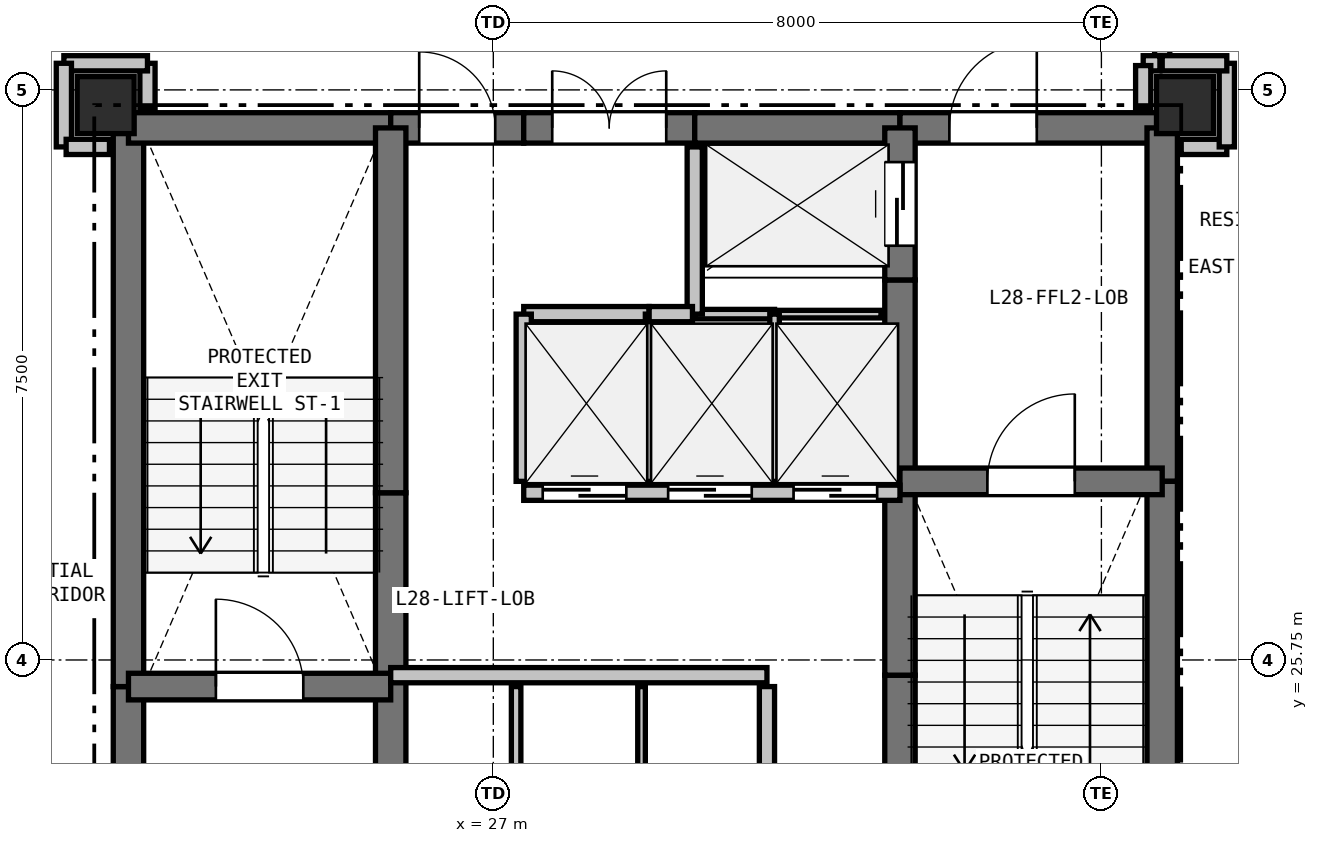
"""IFC4 building model, lengths in metres.
Left out: names, types, materials, properties, quantities, classifications, styles, units other than length and angle.
Written with IfcOpenShell. Run it as: python <this file> out.ifc"""

import sys

from ifc_helpers import new_model, si_unit, direction, frame, frame_2d, origin, origin_2d, place, context, subcontext, project, spatial, rectangle, extrude, element, fill, save


model = new_model("IFC4")
c1 = context("Model", 3, precision=1e-05, world=origin(), true_north=direction((0.0, 1.0)))
c2 = subcontext(c1, "Body", "Model", "MODEL_VIEW")
j1 = project(units=[si_unit("LENGTHUNIT", "METRE"), si_unit("PLANEANGLEUNIT", "RADIAN")], contexts=[c1])
p1 = place(None, origin())
s1 = spatial("IfcSite", under=j1, at=p1, CompositionType="ELEMENT")
p2 = place(p1, origin())
s2 = spatial("IfcBuilding", under=s1, at=p2, CompositionType="ELEMENT")
p3 = place(p2, frame((0.0, 0.0, 103.2)))
s3 = spatial("IfcBuildingStorey", under=s2, at=p3, CompositionType="ELEMENT", Elevation=103.2)
for number, where, z_axis, x_axis in (
    (1, (21.9, 33.05, 0.0), (0.0, 0.0, 1.0), (1.0, 0.0, 0.0)),
    (2, (36.1, 33.05, 0.0), (0.0, 0.0, 1.0), (1.0, 0.0, 0.0)),
):
    element("IfcColumn", number, at=place(p3, frame(where, z_axis=z_axis, x_axis=x_axis)), inside=s3, PredefinedType="COLUMN", context=c2, shape_type="SweptSolid", body=[
        extrude(rectangle(XDim=0.75, YDim=0.75, at=origin_2d()), origin(), (0.0, 0.0, 1.0), 3.3),
    ])
p4 = place(p3, frame((22.2, 20.75, 0.0), z_axis=(0.0, 0.0, 1.0), x_axis=(0.0, 1.0, 0.0)))
e3 = element("IfcWall", 3, at=p4, inside=s3, PredefinedType="SHEAR", context=c2, shape_type="SweptSolid", body=[
    extrude(rectangle(XDim=4.65, YDim=0.4, at=frame_2d((2.325, 0.0))), origin(), (0.0, 0.0, 1.0), 3.05),
])
p5 = place(p3, frame((22.2, 25.4, 0.0), z_axis=(0.0, 0.0, 1.0), x_axis=(0.0, 1.0, 0.0)))
e4 = element("IfcWall", 4, at=p5, inside=s3, PredefinedType="SHEAR", context=c2, shape_type="SweptSolid", body=[
    extrude(rectangle(XDim=7.35, YDim=0.4, at=frame_2d((3.675, 0.0))), origin(), (0.0, 0.0, 1.0), 3.05),
])
p6 = place(p3, frame((22.2, 32.75, 0.0), z_axis=(0.0, 0.0, 1.0), x_axis=(1.0, 0.0, 0.0)))
e5 = element("IfcWall", 5, at=p6, inside=s3, PredefinedType="SHEAR", context=c2, shape_type="SweptSolid", body=[
    extrude(rectangle(XDim=3.45, YDim=0.4, at=frame_2d((1.725, 0.0))), origin(), (0.0, 0.0, 1.0), 3.05),
])
p7 = place(p3, frame((25.65, 32.75, 0.0), z_axis=(0.0, 0.0, 1.0), x_axis=(1.0, 0.0, 0.0)))
e6 = element("IfcWall", 6, at=p7, inside=s3, PredefinedType="SHEAR", context=c2, shape_type="SweptSolid", body=[
    extrude(rectangle(XDim=1.75, YDim=0.4, at=frame_2d((0.875, 0.0))), origin(), (0.0, 0.0, 1.0), 3.05),
])
p8 = place(p7, frame((0.375, 0.0, 0.0)))
e7 = element("IfcOpeningElement", 7, at=p8, cuts=e6, PredefinedType="OPENING", context=c2, shape_type="SweptSolid", body=[
    extrude(rectangle(XDim=1.0, YDim=2.15, at=frame_2d((0.5, 1.075))), frame((0.0, 0.21, 0.0), z_axis=(0.0, -1.0, 0.0), x_axis=(1.0, 0.0, 0.0)), (0.0, 0.0, 1.0), 0.42),
])
p9 = place(p3, frame((27.4, 32.75, 0.0), z_axis=(0.0, 0.0, 1.0), x_axis=(1.0, 0.0, 0.0)))
e8 = element("IfcWall", 8, at=p9, inside=s3, PredefinedType="SHEAR", context=c2, shape_type="SweptSolid", body=[
    extrude(rectangle(XDim=2.25, YDim=0.4, at=frame_2d((1.125, 0.0))), origin(), (0.0, 0.0, 1.0), 3.05),
])
p10 = place(p9, frame((0.375, 0.0, 0.0)))
e9 = element("IfcOpeningElement", 9, at=p10, cuts=e8, PredefinedType="OPENING", context=c2, shape_type="SweptSolid", body=[
    extrude(rectangle(XDim=1.5, YDim=2.2, at=frame_2d((0.75, 1.1))), frame((0.0, 0.21, 0.0), z_axis=(0.0, -1.0, 0.0), x_axis=(1.0, 0.0, 0.0)), (0.0, 0.0, 1.0), 0.42),
])
p11 = place(p3, frame((29.65, 32.75, 0.0), z_axis=(0.0, 0.0, 1.0), x_axis=(1.0, 0.0, 0.0)))
e10 = element("IfcWall", 10, at=p11, inside=s3, PredefinedType="SHEAR", context=c2, shape_type="SweptSolid", body=[
    extrude(rectangle(XDim=2.7, YDim=0.4, at=frame_2d((1.35, 0.0))), origin(), (0.0, 0.0, 1.0), 3.05),
])
p12 = place(p3, frame((32.35, 32.75, 0.0), z_axis=(0.0, 0.0, 1.0), x_axis=(1.0, 0.0, 0.0)))
e11 = element("IfcWall", 11, at=p12, inside=s3, PredefinedType="SHEAR", context=c2, shape_type="SweptSolid", body=[
    extrude(rectangle(XDim=3.45, YDim=0.4, at=frame_2d((1.725, 0.0))), origin(), (0.0, 0.0, 1.0), 3.05),
])
p13 = place(p12, frame((0.65, 0.0, 0.0)))
e12 = element("IfcOpeningElement", 12, at=p13, cuts=e11, PredefinedType="OPENING", context=c2, shape_type="SweptSolid", body=[
    extrude(rectangle(XDim=1.15, YDim=2.15, at=frame_2d((0.575, 1.075))), frame((0.0, 0.21, 0.0), z_axis=(0.0, -1.0, 0.0), x_axis=(1.0, 0.0, 0.0)), (0.0, 0.0, 1.0), 0.42),
])
p14 = place(p3, frame((35.8, 32.75, 0.0), z_axis=(0.0, 0.0, 1.0), x_axis=(0.0, -1.0, 0.0)))
e13 = element("IfcWall", 13, at=p14, inside=s3, PredefinedType="SHEAR", context=c2, shape_type="SweptSolid", body=[
    extrude(rectangle(XDim=4.65, YDim=0.4, at=frame_2d((2.325, 0.0))), origin(), (0.0, 0.0, 1.0), 3.05),
])
p15 = place(p3, frame((35.8, 28.1, 0.0), z_axis=(0.0, 0.0, 1.0), x_axis=(0.0, -1.0, 0.0)))
e14 = element("IfcWall", 14, at=p15, inside=s3, PredefinedType="SHEAR", context=c2, shape_type="SweptSolid", body=[
    extrude(rectangle(XDim=7.35, YDim=0.4, at=frame_2d((3.675, 0.0))), origin(), (0.0, 0.0, 1.0), 3.05),
])
p16 = place(p3, frame((25.65, 22.75, 0.0), z_axis=(0.0, 0.0, 1.0), x_axis=(0.0, 1.0, 0.0)))
e15 = element("IfcWall", 15, at=p16, inside=s3, PredefinedType="SHEAR", context=c2, shape_type="SweptSolid", body=[
    extrude(rectangle(XDim=2.8, YDim=0.4, at=frame_2d((1.4, 0.0))), origin(), (0.0, 0.0, 1.0), 3.05),
])
p17 = place(p3, frame((25.65, 25.55, 0.0), z_axis=(0.0, 0.0, 1.0), x_axis=(0.0, 1.0, 0.0)))
e16 = element("IfcWall", 16, at=p17, inside=s3, PredefinedType="SHEAR", context=c2, shape_type="SweptSolid", body=[
    extrude(rectangle(XDim=2.4, YDim=0.4, at=frame_2d((1.2, 0.0))), origin(), (0.0, 0.0, 1.0), 3.05),
])
for number, where, z_axis, x_axis in (
    (17, (25.65, 27.95, 0.0), (0.0, 0.0, 1.0), (0.0, 1.0, 0.0)),
    (18, (32.35, 20.75, 0.0), (0.0, 0.0, 1.0), (0.0, 1.0, 0.0)),
):
    element("IfcWall", number, at=place(p3, frame(where, z_axis=z_axis, x_axis=x_axis)), inside=s3, PredefinedType="SHEAR", context=c2, shape_type="SweptSolid", body=[
        extrude(rectangle(XDim=4.8, YDim=0.4, at=frame_2d((2.4, 0.0))), origin(), (0.0, 0.0, 1.0), 3.05),
    ])
p18 = place(p3, frame((32.35, 25.55, 0.0), z_axis=(0.0, 0.0, 1.0), x_axis=(0.0, 1.0, 0.0)))
e19 = element("IfcWall", 19, at=p18, inside=s3, PredefinedType="SHEAR", context=c2, shape_type="SweptSolid", body=[
    extrude(rectangle(XDim=2.4, YDim=0.4, at=frame_2d((1.2, 0.0))), origin(), (0.0, 0.0, 1.0), 3.05),
])
p19 = place(p3, frame((32.35, 27.95, 0.0), z_axis=(0.0, 0.0, 1.0), x_axis=(0.0, 1.0, 0.0)))
e20 = element("IfcWall", 20, at=p19, inside=s3, PredefinedType="SHEAR", context=c2, shape_type="SweptSolid", body=[
    extrude(rectangle(XDim=2.8, YDim=0.4, at=frame_2d((1.4, 0.0))), origin(), (0.0, 0.0, 1.0), 3.05),
])
p20 = place(p3, frame((32.35, 30.75, 0.0), z_axis=(0.0, 0.0, 1.0), x_axis=(0.0, 1.0, 0.0)))
e21 = element("IfcWall", 21, at=p20, inside=s3, PredefinedType="SHEAR", context=c2, shape_type="SweptSolid", body=[
    extrude(rectangle(XDim=2.0, YDim=0.4, at=frame_2d((1.0, 0.0))), origin(), (0.0, 0.0, 1.0), 3.05),
])
p21 = place(p20, frame((0.45, 0.0, 0.0)))
e22 = element("IfcOpeningElement", 22, at=p21, cuts=e21, PredefinedType="OPENING", context=c2, shape_type="SweptSolid", body=[
    extrude(rectangle(XDim=1.1, YDim=2.15, at=frame_2d((0.55, 1.075))), frame((0.0, 0.21, 0.0), z_axis=(0.0, -1.0, 0.0), x_axis=(1.0, 0.0, 0.0)), (0.0, 0.0, 1.0), 0.42),
])
p22 = place(p3, frame((22.2, 25.4, 0.0), z_axis=(0.0, 0.0, 1.0), x_axis=(1.0, 0.0, 0.0)))
e23 = element("IfcWall", 23, at=p22, inside=s3, PredefinedType="SHEAR", context=c2, shape_type="SweptSolid", body=[
    extrude(rectangle(XDim=3.45, YDim=0.35, at=frame_2d((1.725, 0.0))), origin(), (0.0, 0.0, 1.0), 3.05),
])
p23 = place(p22, frame((1.15, 0.0, 0.0)))
e24 = element("IfcOpeningElement", 24, at=p23, cuts=e23, PredefinedType="OPENING", context=c2, shape_type="SweptSolid", body=[
    extrude(rectangle(XDim=1.15, YDim=2.15, at=frame_2d((0.575, 1.075))), frame((0.0, 0.185, 0.0), z_axis=(0.0, -1.0, 0.0), x_axis=(1.0, 0.0, 0.0)), (0.0, 0.0, 1.0), 0.37),
])
p24 = place(p3, frame((32.35, 28.1, 0.0), z_axis=(0.0, 0.0, 1.0), x_axis=(1.0, 0.0, 0.0)))
e25 = element("IfcWall", 25, at=p24, inside=s3, PredefinedType="SHEAR", context=c2, shape_type="SweptSolid", body=[
    extrude(rectangle(XDim=3.45, YDim=0.35, at=frame_2d((1.725, 0.0))), origin(), (0.0, 0.0, 1.0), 3.05),
])
p25 = place(p24, frame((1.15, 0.0, 0.0)))
e26 = element("IfcOpeningElement", 26, at=p25, cuts=e25, PredefinedType="OPENING", context=c2, shape_type="SweptSolid", body=[
    extrude(rectangle(XDim=1.15, YDim=2.15, at=frame_2d((0.575, 1.075))), frame((0.0, 0.185, 0.0), z_axis=(0.0, -1.0, 0.0), x_axis=(1.0, 0.0, 0.0)), (0.0, 0.0, 1.0), 0.37),
])
p26 = place(p3, frame((25.65, 25.55, 0.0), z_axis=(0.0, 0.0, 1.0), x_axis=(1.0, 0.0, 0.0)))
e27 = element("IfcWall", 27, at=p26, inside=s3, PredefinedType="PARTITIONING", context=c2, shape_type="SweptSolid", body=[
    extrude(rectangle(XDim=4.95, YDim=0.2, at=frame_2d((2.475, 0.0))), origin(), (0.0, 0.0, 1.0), 3.05),
])
p27 = place(p3, frame((27.4, 27.95, 0.0), z_axis=(0.0, 0.0, 1.0), x_axis=(1.0, 0.0, 0.0)))
e28 = element("IfcWall", 28, at=p27, inside=s3, PredefinedType="PARTITIONING", context=c2, shape_type="SweptSolid", body=[
    extrude(rectangle(XDim=4.95, YDim=0.2, at=frame_2d((2.475, 0.0))), origin(), (0.0, 0.0, 1.0), 3.05),
])
p28 = place(p27, frame((0.25, 0.0, 0.0)))
e29 = element("IfcOpeningElement", 29, at=p28, cuts=e28, PredefinedType="OPENING", context=c2, shape_type="SweptSolid", body=[
    extrude(rectangle(XDim=1.1, YDim=2.15, at=frame_2d((0.55, 1.075))), frame((0.0, 0.11, 0.0), z_axis=(0.0, -1.0, 0.0), x_axis=(1.0, 0.0, 0.0)), (0.0, 0.0, 1.0), 0.22),
])
p29 = place(p27, frame((1.9, 0.0, 0.0)))
e30 = element("IfcOpeningElement", 30, at=p29, cuts=e28, PredefinedType="OPENING", context=c2, shape_type="SweptSolid", body=[
    extrude(rectangle(XDim=1.1, YDim=2.15, at=frame_2d((0.55, 1.075))), frame((0.0, 0.11, 0.0), z_axis=(0.0, -1.0, 0.0), x_axis=(1.0, 0.0, 0.0)), (0.0, 0.0, 1.0), 0.22),
])
p30 = place(p27, frame((3.55, 0.0, 0.0)))
e31 = element("IfcOpeningElement", 31, at=p30, cuts=e28, PredefinedType="OPENING", context=c2, shape_type="SweptSolid", body=[
    extrude(rectangle(XDim=1.1, YDim=2.15, at=frame_2d((0.55, 1.075))), frame((0.0, 0.11, 0.0), z_axis=(0.0, -1.0, 0.0), x_axis=(1.0, 0.0, 0.0)), (0.0, 0.0, 1.0), 0.22),
])
p31 = place(p3, frame((32.1, 30.3, 0.0), z_axis=(0.0, 0.0, 1.0), x_axis=(-1.0, 0.0, 0.0)))
e32 = element("IfcWall", 32, at=p31, inside=s3, PredefinedType="PARTITIONING", context=c2, shape_type="SweptSolid", body=[
    extrude(rectangle(XDim=1.4, YDim=0.1, at=frame_2d((0.7, 0.0))), origin(), (0.0, 0.0, 1.0), 3.05),
])
p32 = place(p3, frame((30.7, 30.3, 0.0), z_axis=(0.0, 0.0, 1.0), x_axis=(-1.0, 0.0, 0.0)))
e33 = element("IfcWall", 33, at=p32, inside=s3, PredefinedType="PARTITIONING", context=c2, shape_type="SweptSolid", body=[
    extrude(rectangle(XDim=1.05, YDim=0.125, at=frame_2d((0.525, 0.0))), origin(), (0.0, 0.0, 1.0), 3.05),
])
p33 = place(p3, frame((29.65, 30.3, 0.0), z_axis=(0.0, 0.0, 1.0), x_axis=(0.0, 1.0, 0.0)))
e34 = element("IfcWall", 34, at=p33, inside=s3, PredefinedType="PARTITIONING", context=c2, shape_type="SweptSolid", body=[
    extrude(rectangle(XDim=2.2, YDim=0.2, at=frame_2d((1.1, 0.0))), origin(), (0.0, 0.0, 1.0), 3.05),
])
p34 = place(p3, frame((27.3, 25.4, 0.0), z_axis=(0.0, 0.0, 1.0), x_axis=(0.0, -1.0, 0.0)))
e35 = element("IfcWall", 35, at=p34, inside=s3, PredefinedType="PARTITIONING", context=c2, shape_type="SweptSolid", body=[
    extrude(rectangle(XDim=2.2, YDim=0.125, at=frame_2d((1.1, 0.0))), origin(), (0.0, 0.0, 1.0), 3.05),
])
p35 = place(p3, frame((28.95, 25.4, 0.0), z_axis=(0.0, 0.0, 1.0), x_axis=(0.0, -1.0, 0.0)))
e36 = element("IfcWall", 36, at=p35, inside=s3, PredefinedType="PARTITIONING", context=c2, shape_type="SweptSolid", body=[
    extrude(rectangle(XDim=2.2, YDim=0.1, at=frame_2d((1.1, 0.0))), origin(), (0.0, 0.0, 1.0), 3.05),
])
p36 = place(p3, frame((30.6, 25.4, 0.0), z_axis=(0.0, 0.0, 1.0), x_axis=(0.0, -1.0, 0.0)))
e37 = element("IfcWall", 37, at=p36, inside=s3, PredefinedType="PARTITIONING", context=c2, shape_type="SweptSolid", body=[
    extrude(rectangle(XDim=2.2, YDim=0.2, at=frame_2d((1.1, 0.0))), origin(), (0.0, 0.0, 1.0), 3.05),
])
p37 = place(p3, frame((27.4, 30.3, 0.0), z_axis=(0.0, 0.0, 1.0), x_axis=(1.0, 0.0, 0.0)))
e38 = element("IfcWall", 38, at=p37, inside=s3, PredefinedType="PARTITIONING", context=c2, shape_type="SweptSolid", body=[
    extrude(rectangle(XDim=1.65, YDim=0.2, at=frame_2d((0.825, 0.0))), origin(), (0.0, 0.0, 1.0), 3.05),
])
p38 = place(p3, frame((29.05, 30.3, 0.0), z_axis=(0.0, 0.0, 1.0), x_axis=(0.0, -1.0, 0.0)))
e39 = element("IfcWall", 39, at=p38, inside=s3, PredefinedType="PARTITIONING", context=c2, shape_type="SweptSolid", body=[
    extrude(rectangle(XDim=2.2, YDim=0.1, at=frame_2d((1.1, 0.0))), origin(), (0.0, 0.0, 1.0), 3.05),
])
p39 = place(p3, frame((27.4, 28.1, 0.0), z_axis=(0.0, 0.0, 1.0), x_axis=(0.0, 1.0, 0.0)))
e40 = element("IfcWall", 40, at=p39, inside=s3, PredefinedType="PARTITIONING", context=c2, shape_type="SweptSolid", body=[
    extrude(rectangle(XDim=2.2, YDim=0.2, at=frame_2d((1.1, 0.0))), origin(), (0.0, 0.0, 1.0), 3.05),
])
p40 = place(p3, frame((29.05, 30.3, 0.0), z_axis=(0.0, 0.0, 1.0), x_axis=(1.0, 0.0, 0.0)))
e41 = element("IfcWall", 41, at=p40, inside=s3, PredefinedType="PARTITIONING", context=c2, shape_type="SweptSolid", body=[
    extrude(rectangle(XDim=0.57, YDim=0.2, at=frame_2d((0.285, 0.0))), origin(), (0.0, 0.0, 1.0), 3.05),
])
p41 = place(p3, frame((30.7, 30.3, 0.0), z_axis=(0.0, 0.0, 1.0), x_axis=(0.0, -1.0, 0.0)))
e42 = element("IfcWall", 42, at=p41, inside=s3, PredefinedType="PARTITIONING", context=c2, shape_type="SweptSolid", body=[
    extrude(rectangle(XDim=2.2, YDim=0.125, at=frame_2d((1.1, 0.0))), origin(), (0.0, 0.0, 1.0), 3.05),
])
p42 = place(p3, frame((35.8, 35.35, 0.0), z_axis=(0.0, 0.0, 1.0), x_axis=(0.0, -1.0, 0.0)))
e43 = element("IfcWall", 43, at=p42, inside=s3, PredefinedType="PARTITIONING", context=c2, shape_type="SweptSolid", body=[
    extrude(rectangle(XDim=1.75, YDim=0.2, at=frame_2d((0.875, 0.0))), origin(), (0.0, 0.0, 1.0), 3.05),
])
p43 = place(p42, frame((0.375, 0.0, 0.0)))
e44 = element("IfcOpeningElement", 44, at=p43, cuts=e43, PredefinedType="OPENING", context=c2, shape_type="SweptSolid", body=[
    extrude(rectangle(XDim=1.0, YDim=2.15, at=frame_2d((0.5, 1.075))), frame((0.0, 0.11, 0.0), z_axis=(0.0, -1.0, 0.0), x_axis=(1.0, 0.0, 0.0)), (0.0, 0.0, 1.0), 0.22),
])
p44 = place(p3, frame((35.77, 33.6, 0.0), z_axis=(0.0, 0.0, 1.0), x_axis=(-1.0, 0.0, 0.0)))
e45 = element("IfcWall", 45, at=p44, inside=s3, PredefinedType="PARTITIONING", context=c2, shape_type="SweptSolid", body=[
    extrude(rectangle(XDim=0.22, YDim=0.2, at=frame_2d((0.11, 0.0))), origin(), (0.0, 0.0, 1.0), 3.05),
])
p45 = place(p3, frame((35.55, 33.57, 0.0), z_axis=(0.0, 0.0, 1.0), x_axis=(0.0, -1.0, 0.0)))
e46 = element("IfcWall", 46, at=p45, inside=s3, PredefinedType="PARTITIONING", context=c2, shape_type="SweptSolid", body=[
    extrude(rectangle(XDim=0.57, YDim=0.2, at=frame_2d((0.285, 0.0))), origin(), (0.0, 0.0, 1.0), 2.498),
])
p46 = place(p3, frame((22.45, 33.0, 0.0), z_axis=(0.0, 0.0, 1.0), x_axis=(0.0, 1.0, 0.0)))
e47 = element("IfcWall", 47, at=p46, inside=s3, PredefinedType="PARTITIONING", context=c2, shape_type="SweptSolid", body=[
    extrude(rectangle(XDim=0.6, YDim=0.2, at=frame_2d((0.3, 0.0))), origin(), (0.0, 0.0, 1.0), 2.498),
])
p47 = place(p3, frame((22.45, 33.6, 0.0), z_axis=(0.0, 0.0, 1.0), x_axis=(-1.0, 0.0, 0.0)))
e48 = element("IfcWall", 48, at=p47, inside=s3, PredefinedType="PARTITIONING", context=c2, shape_type="SweptSolid", body=[
    extrude(rectangle(XDim=1.1, YDim=0.2, at=frame_2d((0.55, 0.0))), origin(), (0.0, 0.0, 1.0), 3.05),
])
p48 = place(p3, frame((21.35, 33.6, 0.0), z_axis=(0.0, 0.0, 1.0), x_axis=(0.0, -1.0, 0.0)))
e49 = element("IfcWall", 49, at=p48, inside=s3, PredefinedType="PARTITIONING", context=c2, shape_type="SweptSolid", body=[
    extrude(rectangle(XDim=1.1, YDim=0.2, at=frame_2d((0.55, 0.0))), origin(), (0.0, 0.0, 1.0), 2.423),
])
p49 = place(p3, frame((21.38, 32.5, 0.0), z_axis=(0.0, 0.0, 1.0), x_axis=(1.0, 0.0, 0.0)))
e50 = element("IfcWall", 50, at=p49, inside=s3, PredefinedType="PARTITIONING", context=c2, shape_type="SweptSolid", body=[
    extrude(rectangle(XDim=0.57, YDim=0.2, at=frame_2d((0.285, 0.0))), origin(), (0.0, 0.0, 1.0), 2.498),
])
p50 = place(p3, frame((36.05, 32.5, 0.0), z_axis=(0.0, 0.0, 1.0), x_axis=(1.0, 0.0, 0.0)))
e51 = element("IfcWall", 51, at=p50, inside=s3, PredefinedType="PARTITIONING", context=c2, shape_type="SweptSolid", body=[
    extrude(rectangle(XDim=0.6, YDim=0.2, at=frame_2d((0.3, 0.0))), origin(), (0.0, 0.0, 1.0), 2.498),
])
p51 = place(p3, frame((36.65, 32.5, 0.0), z_axis=(0.0, 0.0, 1.0), x_axis=(0.0, 1.0, 0.0)))
e52 = element("IfcWall", 52, at=p51, inside=s3, PredefinedType="PARTITIONING", context=c2, shape_type="SweptSolid", body=[
    extrude(rectangle(XDim=1.1, YDim=0.2, at=frame_2d((0.55, 0.0))), origin(), (0.0, 0.0, 1.0), 2.423),
])
p52 = place(p3, frame((36.65, 33.6, 0.0), z_axis=(0.0, 0.0, 1.0), x_axis=(-1.0, 0.0, 0.0)))
e53 = element("IfcWall", 53, at=p52, inside=s3, PredefinedType="PARTITIONING", context=c2, shape_type="SweptSolid", body=[
    extrude(rectangle(XDim=0.85, YDim=0.2, at=frame_2d((0.425, 0.0))), origin(), (0.0, 0.0, 1.0), 2.423),
])
p53 = place(p28, origin())
e54 = element("IfcDoor", 54, at=p53, inside=s3, OperationType="SLIDING_TO_LEFT", PredefinedType="DOOR", context=c2, shape_type="SweptSolid", body=[
    extrude(rectangle(XDim=1.1, YDim=2.15, at=frame_2d((0.55, 1.075))), frame((0.0, 0.025, 0.0), z_axis=(0.0, -1.0, 0.0), x_axis=(1.0, 0.0, 0.0)), (0.0, 0.0, 1.0), 0.05),
])
fill(e29, e54)
p54 = place(p29, origin())
e55 = element("IfcDoor", 55, at=p54, inside=s3, OperationType="SLIDING_TO_LEFT", PredefinedType="DOOR", context=c2, shape_type="SweptSolid", body=[
    extrude(rectangle(XDim=1.1, YDim=2.15, at=frame_2d((0.55, 1.075))), frame((0.0, 0.025, 0.0), z_axis=(0.0, -1.0, 0.0), x_axis=(1.0, 0.0, 0.0)), (0.0, 0.0, 1.0), 0.05),
])
fill(e30, e55)
p55 = place(p30, origin())
e56 = element("IfcDoor", 56, at=p55, inside=s3, OperationType="SLIDING_TO_LEFT", PredefinedType="DOOR", context=c2, shape_type="SweptSolid", body=[
    extrude(rectangle(XDim=1.1, YDim=2.15, at=frame_2d((0.55, 1.075))), frame((0.0, 0.025, 0.0), z_axis=(0.0, -1.0, 0.0), x_axis=(1.0, 0.0, 0.0)), (0.0, 0.0, 1.0), 0.05),
])
fill(e31, e56)
p56 = place(p8, origin())
e57 = element("IfcDoor", 57, at=p56, inside=s3, OperationType="SINGLE_SWING_LEFT", PredefinedType="DOOR", context=c2, shape_type="SweptSolid", body=[
    extrude(rectangle(XDim=1.0, YDim=2.15, at=frame_2d((0.5, 1.075))), frame((0.0, 0.025, 0.0), z_axis=(0.0, -1.0, 0.0), x_axis=(1.0, 0.0, 0.0)), (0.0, 0.0, 1.0), 0.05),
])
fill(e7, e57)
p57 = place(p21, origin())
e58 = element("IfcDoor", 58, at=p57, inside=s3, OperationType="SLIDING_TO_LEFT", PredefinedType="DOOR", context=c2, shape_type="SweptSolid", body=[
    extrude(rectangle(XDim=1.1, YDim=2.15, at=frame_2d((0.55, 1.075))), frame((0.0, 0.025, 0.0), z_axis=(0.0, -1.0, 0.0), x_axis=(1.0, 0.0, 0.0)), (0.0, 0.0, 1.0), 0.05),
])
fill(e22, e58)
p58 = place(p23, origin())
e59 = element("IfcDoor", 59, at=p58, inside=s3, OperationType="SINGLE_SWING_LEFT", PredefinedType="DOOR", context=c2, shape_type="SweptSolid", body=[
    extrude(rectangle(XDim=1.15, YDim=2.15, at=frame_2d((0.575, 1.075))), frame((0.0, 0.025, 0.0), z_axis=(0.0, -1.0, 0.0), x_axis=(1.0, 0.0, 0.0)), (0.0, 0.0, 1.0), 0.05),
])
fill(e24, e59)
p59 = place(p25, origin())
e60 = element("IfcDoor", 60, at=p59, inside=s3, OperationType="SINGLE_SWING_RIGHT", PredefinedType="DOOR", context=c2, shape_type="SweptSolid", body=[
    extrude(rectangle(XDim=1.15, YDim=2.15, at=frame_2d((0.575, 1.075))), frame((0.0, 0.025, 0.0), z_axis=(0.0, -1.0, 0.0), x_axis=(1.0, 0.0, 0.0)), (0.0, 0.0, 1.0), 0.05),
])
fill(e26, e60)
p60 = place(p13, origin())
e61 = element("IfcDoor", 61, at=p60, inside=s3, OperationType="SINGLE_SWING_RIGHT", PredefinedType="DOOR", context=c2, shape_type="SweptSolid", body=[
    extrude(rectangle(XDim=1.15, YDim=2.15, at=frame_2d((0.575, 1.075))), frame((0.0, 0.025, 0.0), z_axis=(0.0, -1.0, 0.0), x_axis=(1.0, 0.0, 0.0)), (0.0, 0.0, 1.0), 0.05),
])
fill(e12, e61)
p61 = place(p10, origin())
e62 = element("IfcDoor", 62, at=p61, inside=s3, OperationType="DOUBLE_DOOR_SINGLE_SWING", PredefinedType="DOOR", context=c2, shape_type="SweptSolid", body=[
    extrude(rectangle(XDim=1.5, YDim=2.2, at=frame_2d((0.75, 1.1))), frame((0.0, 0.025, 0.0), z_axis=(0.0, -1.0, 0.0), x_axis=(1.0, 0.0, 0.0)), (0.0, 0.0, 1.0), 0.05),
])
fill(e9, e62)
save(model, sys.argv[1])
